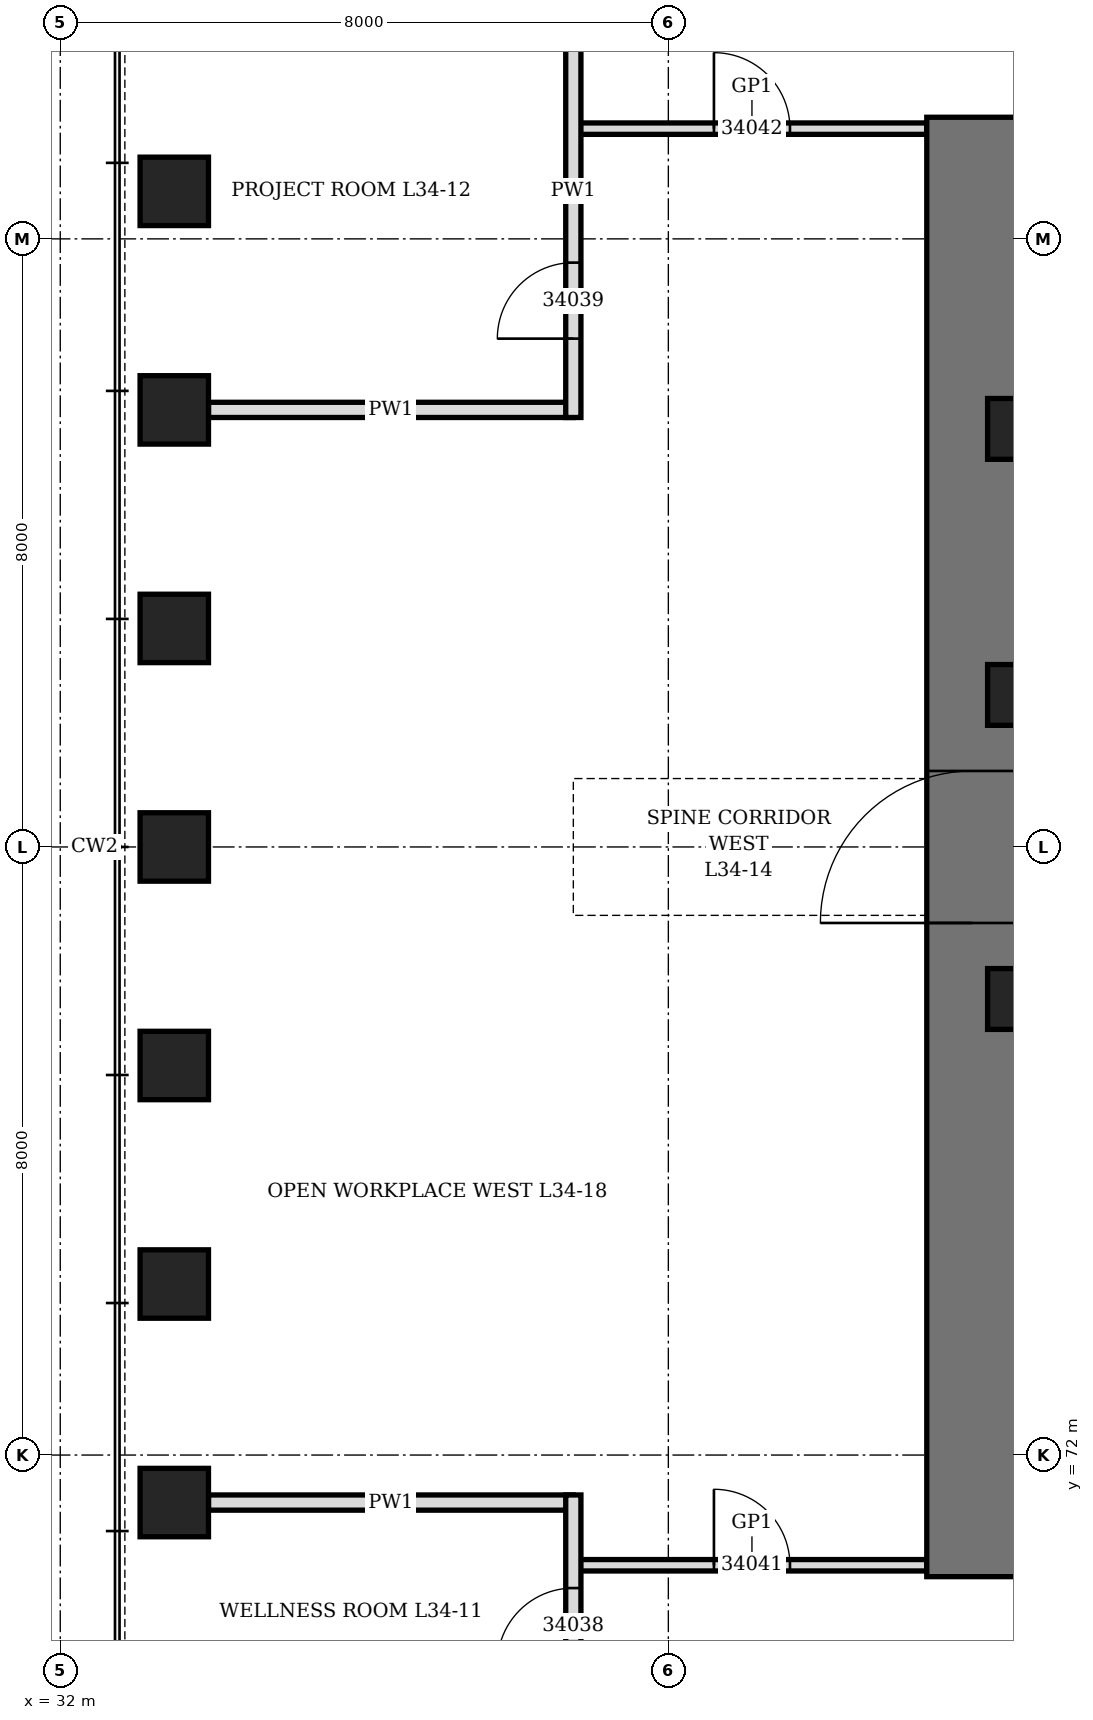
"""IFC4 building model, lengths in metres.
Left out: names, types, materials, properties, quantities, classifications, styles, units other than length and angle.
Written with IfcOpenShell. Run it as: python <this file> out.ifc"""

import sys

from ifc_helpers import new_model, si_unit, direction, frame, frame_2d, origin, origin_2d, place, context, subcontext, project, spatial, rectangle, hollow_rectangle, extrude, element, fill, save


model = new_model("IFC4")
c1 = context("Model", 3, precision=1e-05, world=origin(), true_north=direction((0.0, 1.0)))
c2 = subcontext(c1, "Body", "Model", "MODEL_VIEW")
j1 = project(units=[si_unit("LENGTHUNIT", "METRE"), si_unit("PLANEANGLEUNIT", "RADIAN")], contexts=[c1])
p1 = place(None, origin())
s1 = spatial("IfcSite", under=j1, at=p1, CompositionType="ELEMENT")
p2 = place(p1, origin())
s2 = spatial("IfcBuilding", under=s1, at=p2, CompositionType="ELEMENT")
p3 = place(p2, frame((0.0, 0.0, 154.3)))
s3 = spatial("IfcBuildingStorey", under=s2, at=p3, CompositionType="ELEMENT", Elevation=154.3)
for number, where, z_axis, x_axis in (
    (1, (33.5, 88.625, 0.0), (0.0, 0.0, 1.0), (0.0, 1.0, 0.0)),
    (2, (33.5, 85.75, 0.0), (0.0, 0.0, 1.0), (0.0, 1.0, 0.0)),
    (3, (33.5, 82.875, 0.0), (0.0, 0.0, 1.0), (0.0, 1.0, 0.0)),
    (4, (33.5, 80.0, 0.0), (0.0, 0.0, 1.0), (0.0, 1.0, 0.0)),
    (5, (33.5, 77.125, 0.0), (0.0, 0.0, 1.0), (0.0, 1.0, 0.0)),
    (6, (33.5, 74.25, 0.0), (0.0, 0.0, 1.0), (0.0, 1.0, 0.0)),
    (7, (33.5, 71.375, 0.0), (0.0, 0.0, 1.0), (0.0, 1.0, 0.0)),
):
    element("IfcColumn", number, at=place(p3, frame(where, z_axis=z_axis, x_axis=x_axis)), inside=s3, PredefinedType="COLUMN", context=c2, shape_type="SweptSolid", body=[
        extrude(hollow_rectangle(XDim=0.9, YDim=0.9, WallThickness=0.12, at=origin_2d()), origin(), (0.0, 0.0, 1.0), 4.2),
    ])
p4 = place(p3, frame((44.0, 70.4, 0.0), z_axis=(0.0, 0.0, 1.0), x_axis=(0.0, 1.0, 0.0)))
e8 = element("IfcWall", 8, at=p4, inside=s3, PredefinedType="SHEAR", context=c2, shape_type="SweptSolid", body=[
    extrude(rectangle(XDim=19.2, YDim=1.2, at=frame_2d((9.6, 0.0))), origin(), (0.0, 0.0, 1.0), 4.2),
])
p5 = place(p4, frame((8.6, 0.0, 0.0)))
e9 = element("IfcOpeningElement", 9, at=p5, cuts=e8, PredefinedType="OPENING", context=c2, shape_type="SweptSolid", body=[
    extrude(rectangle(XDim=2.0, YDim=2.4, at=frame_2d((1.0, 1.2))), frame((0.0, 0.61, 0.0), z_axis=(0.0, -1.0, 0.0), x_axis=(1.0, 0.0, 0.0)), (0.0, 0.0, 1.0), 1.22),
])
for number, where, z_axis, x_axis in (
    (10, (44.6, 78.0, 0.0), (0.0, 0.0, 1.0), (1.0, 0.0, 0.0)),
    (11, (44.6, 82.0, 0.0), (0.0, 0.0, 1.0), (1.0, 0.0, 0.0)),
    (12, (44.6, 85.5, 0.0), (0.0, 0.0, 1.0), (1.0, 0.0, 0.0)),
):
    element("IfcColumn", number, at=place(p3, frame(where, z_axis=z_axis, x_axis=x_axis)), inside=s3, PredefinedType="COLUMN", context=c2, shape_type="SweptSolid", body=[
        extrude(hollow_rectangle(XDim=0.8, YDim=0.8, WallThickness=0.1, at=origin_2d()), origin(), (0.0, 0.0, 1.0), 4.2),
    ])
for number, where, z_axis, x_axis in (
    (13, (33.95, 71.375, 0.0), (0.0, 0.0, 1.0), (1.0, 0.0, 0.0)),
    (14, (33.95, 85.75, 0.0), (0.0, 0.0, 1.0), (1.0, 0.0, 0.0)),
):
    element("IfcWall", number, at=place(p3, frame(where, z_axis=z_axis, x_axis=x_axis)), inside=s3, PredefinedType="PARTITIONING", context=c2, shape_type="SweptSolid", body=[
        extrude(rectangle(XDim=4.8, YDim=0.2, at=frame_2d((2.4, 0.0))), origin(), (0.0, 0.0, 1.0), 3.428),
    ])
p6 = place(p3, frame((38.8, 70.55, 0.0), z_axis=(0.0, 0.0, 1.0), x_axis=(1.0, 0.0, 0.0)))
e15 = element("IfcWall", 15, at=p6, inside=s3, PredefinedType="PARTITIONING", context=c2, shape_type="SweptSolid", body=[
    extrude(rectangle(XDim=4.6, YDim=0.15, at=frame_2d((2.3, 0.0))), origin(), (0.0, 0.0, 1.0), 4.04),
])
p7 = place(p6, frame((1.8, 0.0, 0.0)))
e16 = element("IfcOpeningElement", 16, at=p7, cuts=e15, PredefinedType="OPENING", context=c2, shape_type="SweptSolid", body=[
    extrude(rectangle(XDim=1.0, YDim=2.4, at=frame_2d((0.5, 1.2))), frame((0.0, 0.085, 0.0), z_axis=(0.0, -1.0, 0.0), x_axis=(1.0, 0.0, 0.0)), (0.0, 0.0, 1.0), 0.17),
])
p8 = place(p3, frame((38.8, 89.45, 0.0), z_axis=(0.0, 0.0, 1.0), x_axis=(1.0, 0.0, 0.0)))
e17 = element("IfcWall", 17, at=p8, inside=s3, PredefinedType="PARTITIONING", context=c2, shape_type="SweptSolid", body=[
    extrude(rectangle(XDim=4.6, YDim=0.15, at=frame_2d((2.3, 0.0))), origin(), (0.0, 0.0, 1.0), 4.04),
])
p9 = place(p8, frame((1.8, 0.0, 0.0)))
e18 = element("IfcOpeningElement", 18, at=p9, cuts=e17, PredefinedType="OPENING", context=c2, shape_type="SweptSolid", body=[
    extrude(rectangle(XDim=1.0, YDim=2.4, at=frame_2d((0.5, 1.2))), frame((0.0, 0.085, 0.0), z_axis=(0.0, -1.0, 0.0), x_axis=(1.0, 0.0, 0.0)), (0.0, 0.0, 1.0), 0.17),
])
p10 = place(p3, frame((38.75, 63.2, 0.0), z_axis=(0.0, 0.0, 1.0), x_axis=(0.0, 1.0, 0.0)))
e19 = element("IfcWall", 19, at=p10, inside=s3, PredefinedType="PARTITIONING", context=c2, shape_type="SweptSolid", body=[
    extrude(rectangle(XDim=8.275, YDim=0.2, at=frame_2d((4.138, 0.0))), origin(), (0.0, 0.0, 1.0), 4.04),
])
p11 = place(p10, frame((0.488, 0.0, 0.0)))
e20 = element("IfcOpeningElement", 20, at=p11, cuts=e19, PredefinedType="OPENING", context=c2, shape_type="SweptSolid", body=[
    extrude(rectangle(XDim=1.0, YDim=2.1, at=frame_2d((0.5, 1.05))), frame((0.0, 0.11, 0.0), z_axis=(0.0, -1.0, 0.0), x_axis=(1.0, 0.0, 0.0)), (0.0, 0.0, 1.0), 0.22),
])
p12 = place(p10, frame((6.05, 0.0, 0.0)))
e21 = element("IfcOpeningElement", 21, at=p12, cuts=e19, PredefinedType="OPENING", context=c2, shape_type="SweptSolid", body=[
    extrude(rectangle(XDim=1.0, YDim=2.1, at=frame_2d((0.5, 1.05))), frame((0.0, 0.11, 0.0), z_axis=(0.0, -1.0, 0.0), x_axis=(1.0, 0.0, 0.0)), (0.0, 0.0, 1.0), 0.22),
])
p13 = place(p3, frame((38.75, 85.65, 0.0), z_axis=(0.0, 0.0, 1.0), x_axis=(0.0, 1.0, 0.0)))
e22 = element("IfcWall", 22, at=p13, inside=s3, PredefinedType="PARTITIONING", context=c2, shape_type="SweptSolid", body=[
    extrude(rectangle(XDim=5.95, YDim=0.2, at=frame_2d((2.975, 0.0))), origin(), (0.0, 0.0, 1.0), 4.04),
])
p14 = place(p13, frame((1.038, 0.0, 0.0)))
e23 = element("IfcOpeningElement", 23, at=p14, cuts=e22, PredefinedType="OPENING", context=c2, shape_type="SweptSolid", body=[
    extrude(rectangle(XDim=1.0, YDim=2.1, at=frame_2d((0.5, 1.05))), frame((0.0, 0.11, 0.0), z_axis=(0.0, -1.0, 0.0), x_axis=(1.0, 0.0, 0.0)), (0.0, 0.0, 1.0), 0.22),
])
p15 = place(p5, origin())
e24 = element("IfcDoor", 24, at=p15, inside=s3, OperationType="DOUBLE_DOOR_SINGLE_SWING", PredefinedType="DOOR", context=c2, shape_type="SweptSolid", body=[
    extrude(rectangle(XDim=2.0, YDim=2.4, at=frame_2d((1.0, 1.2))), frame((0.0, 0.35, 0.0), z_axis=(0.0, -1.0, 0.0), x_axis=(1.0, 0.0, 0.0)), (0.0, 0.0, 1.0), 0.7),
])
fill(e9, e24)
p16 = place(p12, origin())
e25 = element("IfcDoor", 25, at=p16, inside=s3, OperationType="SINGLE_SWING_LEFT", PredefinedType="DOOR", context=c2, shape_type="SweptSolid", body=[
    extrude(rectangle(XDim=1.0, YDim=2.1, at=frame_2d((0.5, 1.05))), frame((0.0, 0.1, 0.0), z_axis=(0.0, -1.0, 0.0), x_axis=(1.0, 0.0, 0.0)), (0.0, 0.0, 1.0), 0.199),
])
fill(e21, e25)
p17 = place(p14, origin())
e26 = element("IfcDoor", 26, at=p17, inside=s3, OperationType="SINGLE_SWING_LEFT", PredefinedType="DOOR", context=c2, shape_type="SweptSolid", body=[
    extrude(rectangle(XDim=1.0, YDim=2.1, at=frame_2d((0.5, 1.05))), frame((0.0, 0.1, 0.0), z_axis=(0.0, -1.0, 0.0), x_axis=(1.0, 0.0, 0.0)), (0.0, 0.0, 1.0), 0.199),
])
fill(e23, e26)
p18 = place(p7, origin())
e27 = element("IfcDoor", 27, at=p18, inside=s3, OperationType="SINGLE_SWING_RIGHT", PredefinedType="DOOR", context=c2, shape_type="SweptSolid", body=[
    extrude(rectangle(XDim=1.0, YDim=2.4, at=frame_2d((0.5, 1.2))), frame((0.0, 0.075, 0.0), z_axis=(0.0, -1.0, 0.0), x_axis=(1.0, 0.0, 0.0)), (0.0, 0.0, 1.0), 0.149),
])
fill(e16, e27)
p19 = place(p9, origin())
e28 = element("IfcDoor", 28, at=p19, inside=s3, OperationType="SINGLE_SWING_RIGHT", PredefinedType="DOOR", context=c2, shape_type="SweptSolid", body=[
    extrude(rectangle(XDim=1.0, YDim=2.4, at=frame_2d((0.5, 1.2))), frame((0.0, 0.075, 0.0), z_axis=(0.0, -1.0, 0.0), x_axis=(1.0, 0.0, 0.0)), (0.0, 0.0, 1.0), 0.149),
])
fill(e18, e28)
save(model, sys.argv[1])
